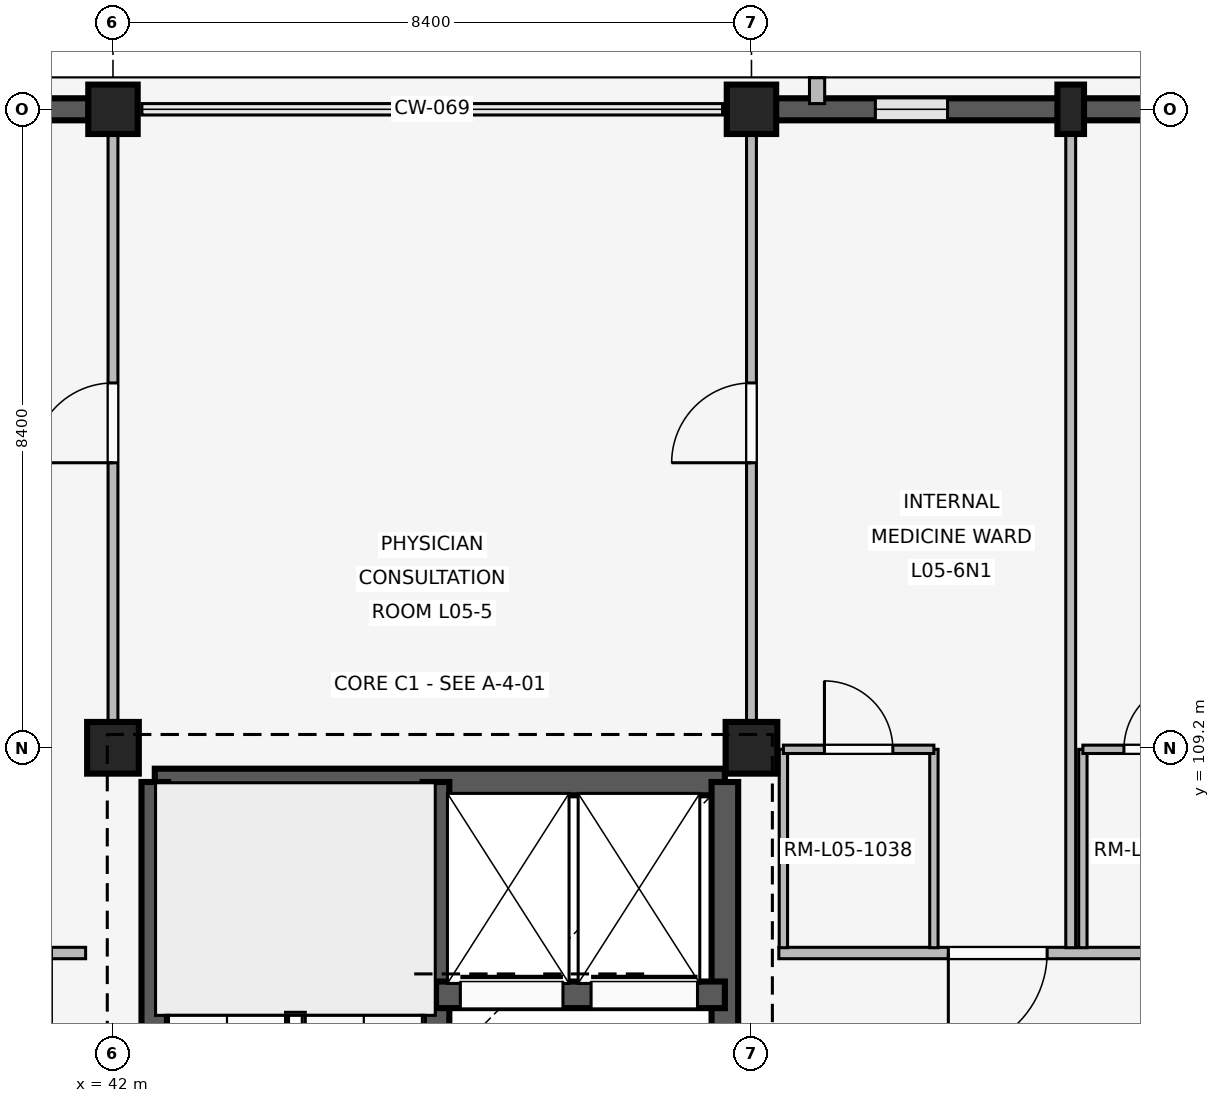
"""IFC4 building model, lengths in metres.
Left out: names, types, materials, properties, quantities, classifications, styles, units other than length and angle.
Written with IfcOpenShell. Run it as: python <this file> out.ifc"""

import sys

from ifc_helpers import new_model, si_unit, direction, frame, frame_2d, origin, origin_2d, place, context, subcontext, project, spatial, rectangle, extrude, element, fill, save


model = new_model("IFC4")
c1 = context("Model", 3, precision=1e-05, world=origin(), true_north=direction((0.0, 1.0)))
c2 = subcontext(c1, "Body", "Model", "MODEL_VIEW")
j1 = project(units=[si_unit("LENGTHUNIT", "METRE"), si_unit("PLANEANGLEUNIT", "RADIAN")], contexts=[c1])
p1 = place(None, origin())
s1 = spatial("IfcSite", under=j1, at=p1, CompositionType="ELEMENT")
p2 = place(p1, origin())
s2 = spatial("IfcBuilding", under=s1, at=p2, CompositionType="ELEMENT")
p3 = place(p2, frame((0.0, 0.0, 20.4)))
s3 = spatial("IfcBuildingStorey", under=s2, at=p3, CompositionType="ELEMENT", Elevation=20.4)
p4 = place(p3, frame((42.0, 109.2, 0.0), z_axis=(0.0, 0.0, 1.0), x_axis=(1.0, 0.0, 0.0)))
e1 = element("IfcColumn", 1, at=p4, inside=s3, PredefinedType="COLUMN", context=c2, shape_type="SweptSolid", body=[
    extrude(rectangle(XDim=0.68, YDim=0.68, at=origin_2d()), origin(), (0.0, 0.0, 1.0), 4.2),
])
p5 = place(p3, frame((42.0, 117.6, 0.0), z_axis=(0.0, 0.0, 1.0), x_axis=(1.0, 0.0, 0.0)))
e2 = element("IfcColumn", 2, at=p5, inside=s3, PredefinedType="COLUMN", context=c2, shape_type="SweptSolid", body=[
    extrude(rectangle(XDim=0.65, YDim=0.65, at=origin_2d()), origin(), (0.0, 0.0, 1.0), 4.2),
])
p6 = place(p3, frame((50.4, 109.2, 0.0), z_axis=(0.0, 0.0, 1.0), x_axis=(1.0, 0.0, 0.0)))
e3 = element("IfcColumn", 3, at=p6, inside=s3, PredefinedType="COLUMN", context=c2, shape_type="SweptSolid", body=[
    extrude(rectangle(XDim=0.68, YDim=0.68, at=origin_2d()), origin(), (0.0, 0.0, 1.0), 4.2),
])
p7 = place(p3, frame((50.4, 117.6, 0.0), z_axis=(0.0, 0.0, 1.0), x_axis=(1.0, 0.0, 0.0)))
e4 = element("IfcColumn", 4, at=p7, inside=s3, PredefinedType="COLUMN", context=c2, shape_type="SweptSolid", body=[
    extrude(rectangle(XDim=0.65, YDim=0.65, at=origin_2d()), origin(), (0.0, 0.0, 1.0), 4.2),
])
p8 = place(p3, frame((54.6, 117.6, 0.0), z_axis=(0.0, 0.0, 1.0), x_axis=(1.0, 0.0, 0.0)))
e5 = element("IfcColumn", 5, at=p8, inside=s3, PredefinedType="PILASTER", context=c2, shape_type="SweptSolid", body=[
    extrude(rectangle(XDim=0.35, YDim=0.65, at=origin_2d()), origin(), (0.0, 0.0, 1.0), 4.2),
])
p9 = place(p3, frame((33.92, 117.6, 0.0), z_axis=(0.0, 0.0, 1.0), x_axis=(1.0, 0.0, 0.0)))
e6 = element("IfcWall", 6, at=p9, inside=s3, PredefinedType="SOLIDWALL", context=c2, shape_type="SweptSolid", body=[
    extrude(rectangle(XDim=7.76, YDim=0.29, at=frame_2d((3.88, 0.0))), origin(), (0.0, 0.0, 1.0), 3.34),
])
p10 = place(p9, frame((1.41, 0.0, 0.85)))
e7 = element("IfcOpeningElement", 7, at=p10, cuts=e6, PredefinedType="OPENING", context=c2, shape_type="SweptSolid", body=[
    extrude(rectangle(XDim=0.75, YDim=1.85, at=frame_2d((0.375, 0.925))), frame((0.0, 0.155, 0.0), z_axis=(0.0, -1.0, 0.0), x_axis=(1.0, 0.0, 0.0)), (0.0, 0.0, 1.0), 0.31),
])
p11 = place(p9, frame((5.6, 0.0, 0.85)))
e8 = element("IfcOpeningElement", 8, at=p11, cuts=e6, PredefinedType="OPENING", context=c2, shape_type="SweptSolid", body=[
    extrude(rectangle(XDim=0.75, YDim=1.85, at=frame_2d((0.375, 0.925))), frame((0.0, 0.155, 0.0), z_axis=(0.0, -1.0, 0.0), x_axis=(1.0, 0.0, 0.0)), (0.0, 0.0, 1.0), 0.31),
])
p12 = place(p3, frame((50.72, 117.6, 0.0), z_axis=(0.0, 0.0, 1.0), x_axis=(1.0, 0.0, 0.0)))
e9 = element("IfcWall", 9, at=p12, inside=s3, PredefinedType="SOLIDWALL", context=c2, shape_type="SweptSolid", body=[
    extrude(rectangle(XDim=7.76, YDim=0.29, at=frame_2d((3.88, 0.0))), origin(), (0.0, 0.0, 1.0), 3.34),
])
p13 = place(p12, frame((1.31, 0.0, 0.85)))
e10 = element("IfcOpeningElement", 10, at=p13, cuts=e9, PredefinedType="OPENING", context=c2, shape_type="SweptSolid", body=[
    extrude(rectangle(XDim=0.95, YDim=1.6, at=frame_2d((0.475, 0.8))), frame((0.0, 0.155, 0.0), z_axis=(0.0, -1.0, 0.0), x_axis=(1.0, 0.0, 0.0)), (0.0, 0.0, 1.0), 0.31),
])
p14 = place(p12, frame((5.5, 0.0, 0.85)))
e11 = element("IfcOpeningElement", 11, at=p14, cuts=e9, PredefinedType="OPENING", context=c2, shape_type="SweptSolid", body=[
    extrude(rectangle(XDim=0.95, YDim=1.6, at=frame_2d((0.475, 0.8))), frame((0.0, 0.155, 0.0), z_axis=(0.0, -1.0, 0.0), x_axis=(1.0, 0.0, 0.0)), (0.0, 0.0, 1.0), 0.31),
])
p15 = place(p3, frame((51.263, 117.675, 0.0), z_axis=(0.0, 0.0, 1.0), x_axis=(0.0, 1.0, 0.0)))
e12 = element("IfcWall", 12, at=p15, inside=s3, PredefinedType="ELEMENTEDWALL", context=c2, shape_type="SweptSolid", body=[
    extrude(rectangle(XDim=0.34, YDim=0.2, at=frame_2d((0.17, 0.0))), origin(), (0.0, 0.0, 1.0), 3.32),
])
p16 = place(p3, frame((42.55, 108.75, 0.0), z_axis=(0.0, 0.0, 1.0), x_axis=(1.0, 0.0, 0.0)))
e13 = element("IfcWall", 13, at=p16, inside=s3, PredefinedType="SHEAR", context=c2, shape_type="SweptSolid", body=[
    extrude(rectangle(XDim=7.5, YDim=0.35, at=frame_2d((3.75, 0.0))), origin(), (0.0, 0.0, 1.0), 3.92),
])
p17 = place(p3, frame((42.55, 101.2, 0.0), z_axis=(0.0, 0.0, 1.0), x_axis=(0.0, 1.0, 0.0)))
e14 = element("IfcWall", 14, at=p17, inside=s3, PredefinedType="SHEAR", context=c2, shape_type="SweptSolid", body=[
    extrude(rectangle(XDim=7.55, YDim=0.35, at=frame_2d((3.775, 0.0))), origin(), (0.0, 0.0, 1.0), 3.92),
])
p18 = place(p17, frame((0.28, 0.0, 0.0)))
e15 = element("IfcOpeningElement", 15, at=p18, cuts=e14, PredefinedType="OPENING", context=c2, shape_type="SweptSolid", body=[
    extrude(rectangle(XDim=1.0, YDim=2.15, at=frame_2d((0.5, 1.075))), frame((0.0, 0.185, 0.0), z_axis=(0.0, -1.0, 0.0), x_axis=(1.0, 0.0, 0.0)), (0.0, 0.0, 1.0), 0.37),
])
p19 = place(p3, frame((50.05, 101.2, 0.0), z_axis=(0.0, 0.0, 1.0), x_axis=(0.0, 1.0, 0.0)))
e16 = element("IfcWall", 16, at=p19, inside=s3, PredefinedType="SHEAR", context=c2, shape_type="SweptSolid", body=[
    extrude(rectangle(XDim=7.55, YDim=0.35, at=frame_2d((3.775, 0.0))), origin(), (0.0, 0.0, 1.0), 3.92),
])
p20 = place(p19, frame((2.4, 0.0, 0.0)))
e17 = element("IfcOpeningElement", 17, at=p20, cuts=e16, PredefinedType="OPENING", context=c2, shape_type="SweptSolid", body=[
    extrude(rectangle(XDim=1.2, YDim=2.2, at=frame_2d((0.6, 1.1))), frame((0.0, 0.185, 0.0), z_axis=(0.0, -1.0, 0.0), x_axis=(1.0, 0.0, 0.0)), (0.0, 0.0, 1.0), 0.37),
])
p21 = place(p3, frame((46.25, 101.2, 0.0), z_axis=(0.0, 0.0, 1.0), x_axis=(0.0, 1.0, 0.0)))
e18 = element("IfcWall", 18, at=p21, inside=s3, PredefinedType="SHEAR", context=c2, shape_type="SweptSolid", body=[
    extrude(rectangle(XDim=7.55, YDim=0.35, at=frame_2d((3.775, 0.0))), origin(), (0.0, 0.0, 1.0), 3.92),
])
p22 = place(p21, frame((0.28, 0.0, 0.0)))
e19 = element("IfcOpeningElement", 19, at=p22, cuts=e18, PredefinedType="OPENING", context=c2, shape_type="SweptSolid", body=[
    extrude(rectangle(XDim=1.0, YDim=2.15, at=frame_2d((0.5, 1.075))), frame((0.0, 0.185, 0.0), z_axis=(0.0, -1.0, 0.0), x_axis=(1.0, 0.0, 0.0)), (0.0, 0.0, 1.0), 0.37),
])
p23 = place(p3, frame((46.25, 105.95, 0.0), z_axis=(0.0, 0.0, 1.0), x_axis=(1.0, 0.0, 0.0)))
e20 = element("IfcWall", 20, at=p23, inside=s3, PredefinedType="SHEAR", context=c2, shape_type="SweptSolid", body=[
    extrude(rectangle(XDim=3.8, YDim=0.35, at=frame_2d((1.9, 0.0))), origin(), (0.0, 0.0, 1.0), 3.92),
])
p24 = place(p23, frame((0.32, 0.0, 0.0)))
e21 = element("IfcOpeningElement", 21, at=p24, cuts=e20, PredefinedType="OPENING", context=c2, shape_type="SweptSolid", body=[
    extrude(rectangle(XDim=1.35, YDim=2.25, at=frame_2d((0.675, 1.125))), frame((0.0, 0.185, 0.0), z_axis=(0.0, -1.0, 0.0), x_axis=(1.0, 0.0, 0.0)), (0.0, 0.0, 1.0), 0.37),
])
p25 = place(p23, frame((2.04, 0.0, 0.0)))
e22 = element("IfcOpeningElement", 22, at=p25, cuts=e20, PredefinedType="OPENING", context=c2, shape_type="SweptSolid", body=[
    extrude(rectangle(XDim=1.4, YDim=2.25, at=frame_2d((0.7, 1.125))), frame((0.0, 0.185, 0.0), z_axis=(0.0, -1.0, 0.0), x_axis=(1.0, 0.0, 0.0)), (0.0, 0.0, 1.0), 0.37),
])
p26 = place(p3, frame((41.64, 106.5, 0.0), z_axis=(0.0, 0.0, 1.0), x_axis=(-1.0, 0.0, 0.0)))
e23 = element("IfcWall", 23, at=p26, inside=s3, PredefinedType="PARTITIONING", context=c2, shape_type="SweptSolid", body=[
    extrude(rectangle(XDim=7.9, YDim=0.15, at=frame_2d((3.95, 0.0))), origin(), (0.0, 0.0, 1.0), 3.32),
])
p27 = place(p26, frame((0.45, 0.0, 0.0)))
e24 = element("IfcOpeningElement", 24, at=p27, cuts=e23, PredefinedType="OPENING", context=c2, shape_type="SweptSolid", body=[
    extrude(rectangle(XDim=1.3, YDim=2.25, at=frame_2d((0.65, 1.125))), frame((0.0, 0.085, 0.0), z_axis=(0.0, -1.0, 0.0), x_axis=(1.0, 0.0, 0.0)), (0.0, 0.0, 1.0), 0.17),
])
p28 = place(p26, frame((4.15, 0.0, 0.0)))
e25 = element("IfcOpeningElement", 25, at=p28, cuts=e23, PredefinedType="OPENING", context=c2, shape_type="SweptSolid", body=[
    extrude(rectangle(XDim=1.3, YDim=2.25, at=frame_2d((0.65, 1.125))), frame((0.0, 0.085, 0.0), z_axis=(0.0, -1.0, 0.0), x_axis=(1.0, 0.0, 0.0)), (0.0, 0.0, 1.0), 0.17),
])
p29 = place(p3, frame((42.0, 109.55, 0.0), z_axis=(0.0, 0.0, 1.0), x_axis=(0.0, 1.0, 0.0)))
e26 = element("IfcWall", 26, at=p29, inside=s3, PredefinedType="PARTITIONING", context=c2, shape_type="SweptSolid", body=[
    extrude(rectangle(XDim=7.91, YDim=0.13, at=frame_2d((3.955, 0.0))), origin(), (0.0, 0.0, 1.0), 3.32),
])
p30 = place(p29, frame((3.4, 0.0, 0.0)))
e27 = element("IfcOpeningElement", 27, at=p30, cuts=e26, PredefinedType="OPENING", context=c2, shape_type="SweptSolid", body=[
    extrude(rectangle(XDim=1.05, YDim=2.2, at=frame_2d((0.525, 1.1))), frame((0.0, 0.075, 0.0), z_axis=(0.0, -1.0, 0.0), x_axis=(1.0, 0.0, 0.0)), (0.0, 0.0, 1.0), 0.15),
])
p31 = place(p3, frame((50.4, 109.55, 0.0), z_axis=(0.0, 0.0, 1.0), x_axis=(0.0, 1.0, 0.0)))
e28 = element("IfcWall", 28, at=p31, inside=s3, PredefinedType="PARTITIONING", context=c2, shape_type="SweptSolid", body=[
    extrude(rectangle(XDim=7.91, YDim=0.13, at=frame_2d((3.955, 0.0))), origin(), (0.0, 0.0, 1.0), 3.32),
])
p32 = place(p31, frame((3.4, 0.0, 0.0)))
e29 = element("IfcOpeningElement", 29, at=p32, cuts=e28, PredefinedType="OPENING", context=c2, shape_type="SweptSolid", body=[
    extrude(rectangle(XDim=1.05, YDim=2.2, at=frame_2d((0.525, 1.1))), frame((0.0, 0.075, 0.0), z_axis=(0.0, -1.0, 0.0), x_axis=(1.0, 0.0, 0.0)), (0.0, 0.0, 1.0), 0.15),
])
p33 = place(p3, frame((58.72, 106.5, 0.0), z_axis=(0.0, 0.0, 1.0), x_axis=(-1.0, 0.0, 0.0)))
e30 = element("IfcWall", 30, at=p33, inside=s3, PredefinedType="PARTITIONING", context=c2, shape_type="SweptSolid", body=[
    extrude(rectangle(XDim=7.96, YDim=0.15, at=frame_2d((3.98, 0.0))), origin(), (0.0, 0.0, 1.0), 3.32),
])
p34 = place(p33, frame((0.73, 0.0, 0.0)))
e31 = element("IfcOpeningElement", 31, at=p34, cuts=e30, PredefinedType="OPENING", context=c2, shape_type="SweptSolid", body=[
    extrude(rectangle(XDim=1.3, YDim=2.25, at=frame_2d((0.65, 1.125))), frame((0.0, 0.085, 0.0), z_axis=(0.0, -1.0, 0.0), x_axis=(1.0, 0.0, 0.0)), (0.0, 0.0, 1.0), 0.17),
])
p35 = place(p33, frame((4.43, 0.0, 0.0)))
e32 = element("IfcOpeningElement", 32, at=p35, cuts=e30, PredefinedType="OPENING", context=c2, shape_type="SweptSolid", body=[
    extrude(rectangle(XDim=1.3, YDim=2.25, at=frame_2d((0.65, 1.125))), frame((0.0, 0.085, 0.0), z_axis=(0.0, -1.0, 0.0), x_axis=(1.0, 0.0, 0.0)), (0.0, 0.0, 1.0), 0.17),
])
p36 = place(p3, frame((54.6, 106.57, 0.0), z_axis=(0.0, 0.0, 1.0), x_axis=(0.0, 1.0, 0.0)))
e33 = element("IfcWall", 33, at=p36, inside=s3, PredefinedType="PARTITIONING", context=c2, shape_type="SweptSolid", body=[
    extrude(rectangle(XDim=10.93, YDim=0.13, at=frame_2d((5.465, 0.0))), origin(), (0.0, 0.0, 1.0), 3.32),
])
for number, where, z_axis, x_axis in (
    (34, (50.82, 106.57, 0.0), (0.0, 0.0, 1.0), (0.0, 1.0, 0.0)),
    (35, (52.8, 106.57, 0.0), (0.0, 0.0, 1.0), (0.0, 1.0, 0.0)),
):
    element("IfcWall", number, at=place(p3, frame(where, z_axis=z_axis, x_axis=x_axis)), inside=s3, PredefinedType="PARTITIONING", context=c2, shape_type="SweptSolid", body=[
        extrude(rectangle(XDim=2.61, YDim=0.11, at=frame_2d((1.305, 0.0))), origin(), (0.0, 0.0, 1.0), 3.32),
    ])
p37 = place(p3, frame((50.82, 109.18, 0.0), z_axis=(0.0, 0.0, 1.0), x_axis=(1.0, 0.0, 0.0)))
e36 = element("IfcWall", 36, at=p37, inside=s3, PredefinedType="PARTITIONING", context=c2, shape_type="SweptSolid", body=[
    extrude(rectangle(XDim=1.98, YDim=0.11, at=frame_2d((0.99, 0.0))), origin(), (0.0, 0.0, 1.0), 3.32),
])
p38 = place(p37, frame((0.54, 0.0, 0.0)))
e37 = element("IfcOpeningElement", 37, at=p38, cuts=e36, PredefinedType="OPENING", context=c2, shape_type="SweptSolid", body=[
    extrude(rectangle(XDim=0.9, YDim=2.1, at=frame_2d((0.45, 1.05))), frame((0.0, 0.065, 0.0), z_axis=(0.0, -1.0, 0.0), x_axis=(1.0, 0.0, 0.0)), (0.0, 0.0, 1.0), 0.13),
])
p39 = place(p3, frame((54.76, 106.57, 0.0), z_axis=(0.0, 0.0, 1.0), x_axis=(0.0, 1.0, 0.0)))
e38 = element("IfcWall", 38, at=p39, inside=s3, PredefinedType="PARTITIONING", context=c2, shape_type="SweptSolid", body=[
    extrude(rectangle(XDim=2.61, YDim=0.11, at=frame_2d((1.305, 0.0))), origin(), (0.0, 0.0, 1.0), 3.32),
])
p40 = place(p3, frame((54.76, 109.18, 0.0), z_axis=(0.0, 0.0, 1.0), x_axis=(1.0, 0.0, 0.0)))
e39 = element("IfcWall", 39, at=p40, inside=s3, PredefinedType="PARTITIONING", context=c2, shape_type="SweptSolid", body=[
    extrude(rectangle(XDim=1.98, YDim=0.11, at=frame_2d((0.99, 0.0))), origin(), (0.0, 0.0, 1.0), 3.32),
])
p41 = place(p40, frame((0.54, 0.0, 0.0)))
e40 = element("IfcOpeningElement", 40, at=p41, cuts=e39, PredefinedType="OPENING", context=c2, shape_type="SweptSolid", body=[
    extrude(rectangle(XDim=0.9, YDim=2.1, at=frame_2d((0.45, 1.05))), frame((0.0, 0.065, 0.0), z_axis=(0.0, -1.0, 0.0), x_axis=(1.0, 0.0, 0.0)), (0.0, 0.0, 1.0), 0.13),
])
p42 = place(p13, origin())
e41 = element("IfcWindow", 41, at=p42, inside=s3, PartitioningType="SINGLE_PANEL", PredefinedType="WINDOW", context=c2, shape_type="SweptSolid", body=[
    extrude(rectangle(XDim=0.95, YDim=1.6, at=frame_2d((0.475, 0.8))), frame((0.0, 0.03, 0.0), z_axis=(0.0, -1.0, 0.0), x_axis=(1.0, 0.0, 0.0)), (0.0, 0.0, 1.0), 0.06),
])
fill(e10, e41)
p43 = place(p24, origin())
e42 = element("IfcDoor", 42, at=p43, inside=s3, OperationType="SLIDING_TO_LEFT", PredefinedType="DOOR", context=c2, shape_type="SweptSolid", body=[
    extrude(rectangle(XDim=1.35, YDim=2.25, at=frame_2d((0.675, 1.125))), frame((0.0, 0.025, 0.0), z_axis=(0.0, -1.0, 0.0), x_axis=(1.0, 0.0, 0.0)), (0.0, 0.0, 1.0), 0.05),
])
fill(e21, e42)
p44 = place(p25, origin())
e43 = element("IfcDoor", 43, at=p44, inside=s3, OperationType="SLIDING_TO_LEFT", PredefinedType="DOOR", context=c2, shape_type="SweptSolid", body=[
    extrude(rectangle(XDim=1.4, YDim=2.25, at=frame_2d((0.7, 1.125))), frame((0.0, 0.025, 0.0), z_axis=(0.0, -1.0, 0.0), x_axis=(1.0, 0.0, 0.0)), (0.0, 0.0, 1.0), 0.05),
])
fill(e22, e43)
p45 = place(p30, origin())
e44 = element("IfcDoor", 44, at=p45, inside=s3, OperationType="SINGLE_SWING_LEFT", PredefinedType="DOOR", context=c2, shape_type="SweptSolid", body=[
    extrude(rectangle(XDim=1.05, YDim=2.2, at=frame_2d((0.525, 1.1))), frame((0.0, 0.025, 0.0), z_axis=(0.0, -1.0, 0.0), x_axis=(1.0, 0.0, 0.0)), (0.0, 0.0, 1.0), 0.05),
])
fill(e27, e44)
p46 = place(p32, origin())
e45 = element("IfcDoor", 45, at=p46, inside=s3, OperationType="SINGLE_SWING_LEFT", PredefinedType="DOOR", context=c2, shape_type="SweptSolid", body=[
    extrude(rectangle(XDim=1.05, YDim=2.2, at=frame_2d((0.525, 1.1))), frame((0.0, 0.025, 0.0), z_axis=(0.0, -1.0, 0.0), x_axis=(1.0, 0.0, 0.0)), (0.0, 0.0, 1.0), 0.05),
])
fill(e29, e45)
p47 = place(p35, origin())
e46 = element("IfcDoor", 46, at=p47, inside=s3, OperationType="SINGLE_SWING_RIGHT", PredefinedType="DOOR", context=c2, shape_type="SweptSolid", body=[
    extrude(rectangle(XDim=1.3, YDim=2.25, at=frame_2d((0.65, 1.125))), frame((0.0, 0.025, 0.0), z_axis=(0.0, -1.0, 0.0), x_axis=(1.0, 0.0, 0.0)), (0.0, 0.0, 1.0), 0.05),
])
fill(e32, e46)
p48 = place(p38, origin())
e47 = element("IfcDoor", 47, at=p48, inside=s3, OperationType="SINGLE_SWING_LEFT", PredefinedType="DOOR", context=c2, shape_type="SweptSolid", body=[
    extrude(rectangle(XDim=0.9, YDim=2.1, at=frame_2d((0.45, 1.05))), frame((0.0, 0.025, 0.0), z_axis=(0.0, -1.0, 0.0), x_axis=(1.0, 0.0, 0.0)), (0.0, 0.0, 1.0), 0.05),
])
fill(e37, e47)
p49 = place(p41, origin())
e48 = element("IfcDoor", 48, at=p49, inside=s3, OperationType="SINGLE_SWING_RIGHT", PredefinedType="DOOR", context=c2, shape_type="SweptSolid", body=[
    extrude(rectangle(XDim=0.9, YDim=2.1, at=frame_2d((0.45, 1.05))), frame((0.0, 0.025, 0.0), z_axis=(0.0, -1.0, 0.0), x_axis=(1.0, 0.0, 0.0)), (0.0, 0.0, 1.0), 0.05),
])
fill(e40, e48)
save(model, sys.argv[1])
